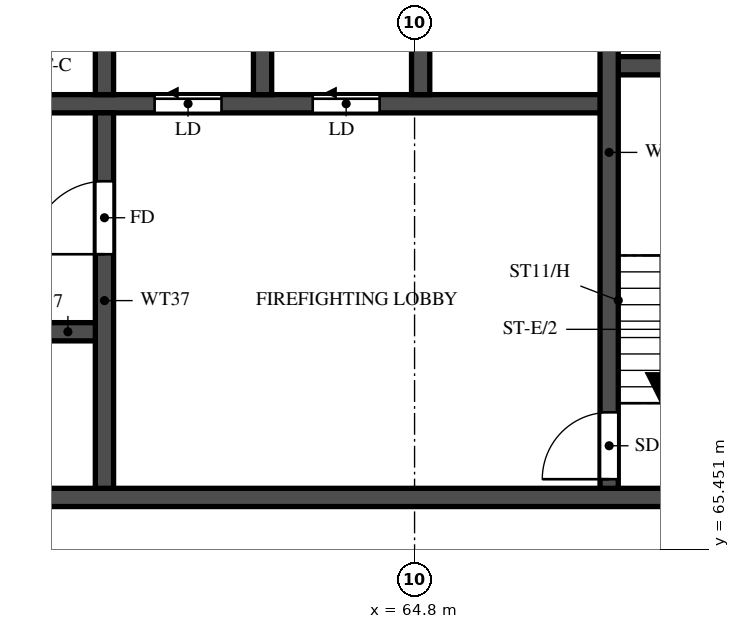
"""IFC4 building model, lengths in metres.
Left out: names, types, materials, properties, quantities, classifications, styles, units other than length and angle.
Written with IfcOpenShell. Run it as: python <this file> out.ifc"""

import sys

from ifc_helpers import new_model, si_unit, direction, frame, frame_2d, origin, place, context, subcontext, project, spatial, rectangle, extrude, element, fill, save


model = new_model("IFC4")
c1 = context("Model", 3, precision=1e-05, world=origin(), true_north=direction((0.0, 1.0)))
c2 = subcontext(c1, "Body", "Model", "MODEL_VIEW")
j1 = project(units=[si_unit("LENGTHUNIT", "METRE"), si_unit("PLANEANGLEUNIT", "RADIAN")], contexts=[c1])
p1 = place(None, origin())
s1 = spatial("IfcSite", under=j1, at=p1, CompositionType="ELEMENT")
p2 = place(p1, origin())
s2 = spatial("IfcBuilding", under=s1, at=p2, CompositionType="ELEMENT")
p3 = place(p2, frame((0.0, 0.0, 236.0)))
s3 = spatial("IfcBuildingStorey", under=s2, at=p3, CompositionType="ELEMENT", Elevation=236.0)
p4 = place(p3, frame((29.2, 66.3, 0.0), z_axis=(0.0, 0.0, 1.0), x_axis=(1.0, 0.0, 0.0)))
e1 = element("IfcWall", 1, at=p4, inside=s3, PredefinedType="SHEAR", context=c2, shape_type="SweptSolid", body=[
    extrude(rectangle(XDim=42.4, YDim=0.3, at=frame_2d((21.2, 0.0))), origin(), (0.0, 0.0, 1.0), 3.22),
])
p5 = place(p4, frame((1.425, 0.0, 0.0)))
e2 = element("IfcOpeningElement", 2, at=p5, cuts=e1, PredefinedType="OPENING", context=c2, shape_type="SweptSolid", body=[
    extrude(rectangle(XDim=1.1, YDim=2.1, at=frame_2d((0.55, 1.05))), frame((0.0, 0.16, 0.0), z_axis=(0.0, -1.0, 0.0), x_axis=(1.0, 0.0, 0.0)), (0.0, 0.0, 1.0), 0.32),
])
p6 = place(p4, frame((4.2, 0.0, 0.0)))
e3 = element("IfcOpeningElement", 3, at=p6, cuts=e1, PredefinedType="OPENING", context=c2, shape_type="SweptSolid", body=[
    extrude(rectangle(XDim=1.8, YDim=2.1, at=frame_2d((0.9, 1.05))), frame((0.0, 0.16, 0.0), z_axis=(0.0, -1.0, 0.0), x_axis=(1.0, 0.0, 0.0)), (0.0, 0.0, 1.0), 0.32),
])
p7 = place(p3, frame((35.65, 69.025, 0.0), z_axis=(0.0, 0.0, 1.0), x_axis=(1.0, 0.0, 0.0)))
e4 = element("IfcWall", 4, at=p7, inside=s3, PredefinedType="SHEAR", context=c2, shape_type="SweptSolid", body=[
    extrude(rectangle(XDim=24.05, YDim=0.3, at=frame_2d((12.025, 0.0))), origin(), (0.0, 0.0, 1.0), 3.22),
])
p8 = place(p7, frame((0.975, 0.0, 0.0)))
e5 = element("IfcOpeningElement", 5, at=p8, cuts=e4, PredefinedType="OPENING", context=c2, shape_type="SweptSolid", body=[
    extrude(rectangle(XDim=1.1, YDim=2.1, at=frame_2d((0.55, 1.05))), frame((0.0, 0.16, 0.0), z_axis=(0.0, -1.0, 0.0), x_axis=(1.0, 0.0, 0.0)), (0.0, 0.0, 1.0), 0.32),
])
p9 = place(p7, frame((3.725, 0.0, 0.0)))
e6 = element("IfcOpeningElement", 6, at=p9, cuts=e4, PredefinedType="OPENING", context=c2, shape_type="SweptSolid", body=[
    extrude(rectangle(XDim=1.1, YDim=2.1, at=frame_2d((0.55, 1.05))), frame((0.0, 0.16, 0.0), z_axis=(0.0, -1.0, 0.0), x_axis=(1.0, 0.0, 0.0)), (0.0, 0.0, 1.0), 0.32),
])
p10 = place(p7, frame((6.475, 0.0, 0.0)))
e7 = element("IfcOpeningElement", 7, at=p10, cuts=e4, PredefinedType="OPENING", context=c2, shape_type="SweptSolid", body=[
    extrude(rectangle(XDim=1.1, YDim=2.1, at=frame_2d((0.55, 1.05))), frame((0.0, 0.16, 0.0), z_axis=(0.0, -1.0, 0.0), x_axis=(1.0, 0.0, 0.0)), (0.0, 0.0, 1.0), 0.32),
])
p11 = place(p7, frame((9.225, 0.0, 0.0)))
e8 = element("IfcOpeningElement", 8, at=p11, cuts=e4, PredefinedType="OPENING", context=c2, shape_type="SweptSolid", body=[
    extrude(rectangle(XDim=1.1, YDim=2.1, at=frame_2d((0.55, 1.05))), frame((0.0, 0.16, 0.0), z_axis=(0.0, -1.0, 0.0), x_axis=(1.0, 0.0, 0.0)), (0.0, 0.0, 1.0), 0.32),
])
p12 = place(p7, frame((11.975, 0.0, 0.0)))
e9 = element("IfcOpeningElement", 9, at=p12, cuts=e4, PredefinedType="OPENING", context=c2, shape_type="SweptSolid", body=[
    extrude(rectangle(XDim=1.1, YDim=2.1, at=frame_2d((0.55, 1.05))), frame((0.0, 0.16, 0.0), z_axis=(0.0, -1.0, 0.0), x_axis=(1.0, 0.0, 0.0)), (0.0, 0.0, 1.0), 0.32),
])
p13 = place(p7, frame((14.725, 0.0, 0.0)))
e10 = element("IfcOpeningElement", 10, at=p13, cuts=e4, PredefinedType="OPENING", context=c2, shape_type="SweptSolid", body=[
    extrude(rectangle(XDim=1.1, YDim=2.1, at=frame_2d((0.55, 1.05))), frame((0.0, 0.16, 0.0), z_axis=(0.0, -1.0, 0.0), x_axis=(1.0, 0.0, 0.0)), (0.0, 0.0, 1.0), 0.32),
])
p14 = place(p7, frame((17.6, 0.0, 0.0)))
e11 = element("IfcOpeningElement", 11, at=p14, cuts=e4, PredefinedType="OPENING", context=c2, shape_type="SweptSolid", body=[
    extrude(rectangle(XDim=1.1, YDim=2.1, at=frame_2d((0.55, 1.05))), frame((0.0, 0.16, 0.0), z_axis=(0.0, -1.0, 0.0), x_axis=(1.0, 0.0, 0.0)), (0.0, 0.0, 1.0), 0.32),
])
p15 = place(p7, frame((20.6, 0.0, 0.0)))
e12 = element("IfcOpeningElement", 12, at=p15, cuts=e4, PredefinedType="OPENING", context=c2, shape_type="SweptSolid", body=[
    extrude(rectangle(XDim=1.1, YDim=2.1, at=frame_2d((0.55, 1.05))), frame((0.0, 0.16, 0.0), z_axis=(0.0, -1.0, 0.0), x_axis=(1.0, 0.0, 0.0)), (0.0, 0.0, 1.0), 0.32),
])
p16 = place(p3, frame((32.8, 72.775, 0.0), z_axis=(0.0, 0.0, 1.0), x_axis=(1.0, 0.0, 0.0)))
e13 = element("IfcWall", 13, at=p16, inside=s3, PredefinedType="SHEAR", context=c2, shape_type="SweptSolid", body=[
    extrude(rectangle(XDim=35.2, YDim=0.3, at=frame_2d((17.6, 0.0))), origin(), (0.0, 0.0, 1.0), 3.22),
])
p17 = place(p16, frame((19.8, 0.0, 0.0)))
e14 = element("IfcOpeningElement", 14, at=p17, cuts=e13, PredefinedType="OPENING", context=c2, shape_type="SweptSolid", body=[
    extrude(rectangle(XDim=1.1, YDim=2.1, at=frame_2d((0.55, 1.05))), frame((0.0, 0.16, 0.0), z_axis=(0.0, -1.0, 0.0), x_axis=(1.0, 0.0, 0.0)), (0.0, 0.0, 1.0), 0.32),
])
p18 = place(p16, frame((27.725, 0.0, 0.0)))
e15 = element("IfcOpeningElement", 15, at=p18, cuts=e13, PredefinedType="OPENING", context=c2, shape_type="SweptSolid", body=[
    extrude(rectangle(XDim=1.1, YDim=2.1, at=frame_2d((0.55, 1.05))), frame((0.0, 0.16, 0.0), z_axis=(0.0, -1.0, 0.0), x_axis=(1.0, 0.0, 0.0)), (0.0, 0.0, 1.0), 0.32),
])
p19 = place(p16, frame((30.325, 0.0, 0.0)))
e16 = element("IfcOpeningElement", 16, at=p19, cuts=e13, PredefinedType="OPENING", context=c2, shape_type="SweptSolid", body=[
    extrude(rectangle(XDim=1.1, YDim=2.1, at=frame_2d((0.55, 1.05))), frame((0.0, 0.16, 0.0), z_axis=(0.0, -1.0, 0.0), x_axis=(1.0, 0.0, 0.0)), (0.0, 0.0, 1.0), 0.32),
])
p20 = place(p16, frame((3.825, 0.0, 0.0)))
e17 = element("IfcOpeningElement", 17, at=p20, cuts=e13, PredefinedType="OPENING", context=c2, shape_type="SweptSolid", body=[
    extrude(rectangle(XDim=1.1, YDim=2.1, at=frame_2d((0.55, 1.05))), frame((0.0, 0.16, 0.0), z_axis=(0.0, -1.0, 0.0), x_axis=(1.0, 0.0, 0.0)), (0.0, 0.0, 1.0), 0.32),
])
p21 = place(p16, frame((6.575, 0.0, 0.0)))
e18 = element("IfcOpeningElement", 18, at=p21, cuts=e13, PredefinedType="OPENING", context=c2, shape_type="SweptSolid", body=[
    extrude(rectangle(XDim=1.1, YDim=2.1, at=frame_2d((0.55, 1.05))), frame((0.0, 0.16, 0.0), z_axis=(0.0, -1.0, 0.0), x_axis=(1.0, 0.0, 0.0)), (0.0, 0.0, 1.0), 0.32),
])
p22 = place(p16, frame((9.325, 0.0, 0.0)))
e19 = element("IfcOpeningElement", 19, at=p22, cuts=e13, PredefinedType="OPENING", context=c2, shape_type="SweptSolid", body=[
    extrude(rectangle(XDim=1.1, YDim=2.1, at=frame_2d((0.55, 1.05))), frame((0.0, 0.16, 0.0), z_axis=(0.0, -1.0, 0.0), x_axis=(1.0, 0.0, 0.0)), (0.0, 0.0, 1.0), 0.32),
])
p23 = place(p16, frame((12.075, 0.0, 0.0)))
e20 = element("IfcOpeningElement", 20, at=p23, cuts=e13, PredefinedType="OPENING", context=c2, shape_type="SweptSolid", body=[
    extrude(rectangle(XDim=1.1, YDim=2.1, at=frame_2d((0.55, 1.05))), frame((0.0, 0.16, 0.0), z_axis=(0.0, -1.0, 0.0), x_axis=(1.0, 0.0, 0.0)), (0.0, 0.0, 1.0), 0.32),
])
p24 = place(p16, frame((14.825, 0.0, 0.0)))
e21 = element("IfcOpeningElement", 21, at=p24, cuts=e13, PredefinedType="OPENING", context=c2, shape_type="SweptSolid", body=[
    extrude(rectangle(XDim=1.1, YDim=2.1, at=frame_2d((0.55, 1.05))), frame((0.0, 0.16, 0.0), z_axis=(0.0, -1.0, 0.0), x_axis=(1.0, 0.0, 0.0)), (0.0, 0.0, 1.0), 0.32),
])
p25 = place(p16, frame((17.575, 0.0, 0.0)))
e22 = element("IfcOpeningElement", 22, at=p25, cuts=e13, PredefinedType="OPENING", context=c2, shape_type="SweptSolid", body=[
    extrude(rectangle(XDim=1.1, YDim=2.1, at=frame_2d((0.55, 1.05))), frame((0.0, 0.16, 0.0), z_axis=(0.0, -1.0, 0.0), x_axis=(1.0, 0.0, 0.0)), (0.0, 0.0, 1.0), 0.32),
])
p26 = place(p16, frame((0.95, 0.0, 0.0)))
e23 = element("IfcOpeningElement", 23, at=p26, cuts=e13, PredefinedType="OPENING", context=c2, shape_type="SweptSolid", body=[
    extrude(rectangle(XDim=1.1, YDim=2.1, at=frame_2d((0.55, 1.05))), frame((0.0, 0.16, 0.0), z_axis=(0.0, -1.0, 0.0), x_axis=(1.0, 0.0, 0.0)), (0.0, 0.0, 1.0), 0.32),
])
p27 = place(p3, frame((68.0, 73.4, 0.0), z_axis=(0.0, 0.0, 1.0), x_axis=(1.0, 0.0, 0.0)))
e24 = element("IfcWall", 24, at=p27, inside=s3, PredefinedType="SHEAR", context=c2, shape_type="SweptSolid", body=[
    extrude(rectangle(XDim=3.1, YDim=0.3, at=frame_2d((1.55, 0.0))), origin(), (0.0, 0.0, 1.0), 3.22),
])
p28 = place(p3, frame((68.0, 66.45, 0.0), z_axis=(0.0, 0.0, 1.0), x_axis=(0.0, 1.0, 0.0)))
e25 = element("IfcWall", 25, at=p28, inside=s3, PredefinedType="SHEAR", context=c2, shape_type="SweptSolid", body=[
    extrude(rectangle(XDim=11.05, YDim=0.3, at=frame_2d((5.525, 0.0))), origin(), (0.0, 0.0, 1.0), 3.22),
])
p29 = place(p28, frame((0.15, 0.0, 0.0)))
e26 = element("IfcOpeningElement", 26, at=p29, cuts=e25, PredefinedType="OPENING", context=c2, shape_type="SweptSolid", body=[
    extrude(rectangle(XDim=1.1, YDim=2.1, at=frame_2d((0.55, 1.05))), frame((0.0, 0.16, 0.0), z_axis=(0.0, -1.0, 0.0), x_axis=(1.0, 0.0, 0.0)), (0.0, 0.0, 1.0), 0.32),
])
p30 = place(p3, frame((59.7, 66.45, 0.0), z_axis=(0.0, 0.0, 1.0), x_axis=(0.0, 1.0, 0.0)))
e27 = element("IfcWall", 27, at=p30, inside=s3, PredefinedType="SHEAR", context=c2, shape_type="SweptSolid", body=[
    extrude(rectangle(XDim=6.175, YDim=0.3, at=frame_2d((3.087, 0.0))), origin(), (0.0, 0.0, 1.0), 3.22),
])
p31 = place(p30, frame((3.85, 0.0, 0.0)))
e28 = element("IfcOpeningElement", 28, at=p31, cuts=e27, PredefinedType="OPENING", context=c2, shape_type="SweptSolid", body=[
    extrude(rectangle(XDim=1.2, YDim=2.1, at=frame_2d((0.6, 1.05))), frame((0.0, 0.16, 0.0), z_axis=(0.0, -1.0, 0.0), x_axis=(1.0, 0.0, 0.0)), (0.0, 0.0, 1.0), 0.32),
])
for number, where, z_axis, x_axis in (
    (29, (59.7, 72.925, 0.0), (0.0, 0.0, 1.0), (0.0, 1.0, 0.0)),
    (30, (62.3, 72.925, 0.0), (0.0, 0.0, 1.0), (0.0, 1.0, 0.0)),
    (31, (64.9, 72.925, 0.0), (0.0, 0.0, 1.0), (0.0, 1.0, 0.0)),
):
    element("IfcWall", number, at=place(p3, frame(where, z_axis=z_axis, x_axis=x_axis)), inside=s3, PredefinedType="SHEAR", context=c2, shape_type="SweptSolid", body=[
        extrude(rectangle(XDim=2.95, YDim=0.3, at=frame_2d((1.475, 0.0))), origin(), (0.0, 0.0, 1.0), 3.22),
    ])
p32 = place(p29, origin())
e32 = element("IfcDoor", 32, at=p32, inside=s3, OperationType="SINGLE_SWING_RIGHT", PredefinedType="DOOR", context=c2, shape_type="SweptSolid", body=[
    extrude(rectangle(XDim=1.1, YDim=2.1, at=frame_2d((0.55, 1.05))), frame((0.0, 0.025, 0.0), z_axis=(0.0, -1.0, 0.0), x_axis=(1.0, 0.0, 0.0)), (0.0, 0.0, 1.0), 0.05),
])
fill(e26, e32)
p33 = place(p31, origin())
e33 = element("IfcDoor", 33, at=p33, inside=s3, OperationType="SINGLE_SWING_LEFT", PredefinedType="DOOR", context=c2, shape_type="SweptSolid", body=[
    extrude(rectangle(XDim=1.2, YDim=2.1, at=frame_2d((0.6, 1.05))), frame((0.0, 0.025, 0.0), z_axis=(0.0, -1.0, 0.0), x_axis=(1.0, 0.0, 0.0)), (0.0, 0.0, 1.0), 0.05),
])
fill(e28, e33)
p34 = place(p18, origin())
e34 = element("IfcDoor", 34, at=p34, inside=s3, OperationType="SLIDING_TO_LEFT", PredefinedType="DOOR", context=c2, shape_type="SweptSolid", body=[
    extrude(rectangle(XDim=1.1, YDim=2.1, at=frame_2d((0.55, 1.05))), frame((0.0, 0.025, 0.0), z_axis=(0.0, -1.0, 0.0), x_axis=(1.0, 0.0, 0.0)), (0.0, 0.0, 1.0), 0.05),
])
fill(e15, e34)
p35 = place(p19, origin())
e35 = element("IfcDoor", 35, at=p35, inside=s3, OperationType="SLIDING_TO_LEFT", PredefinedType="DOOR", context=c2, shape_type="SweptSolid", body=[
    extrude(rectangle(XDim=1.1, YDim=2.1, at=frame_2d((0.55, 1.05))), frame((0.0, 0.025, 0.0), z_axis=(0.0, -1.0, 0.0), x_axis=(1.0, 0.0, 0.0)), (0.0, 0.0, 1.0), 0.05),
])
fill(e16, e35)
save(model, sys.argv[1])
